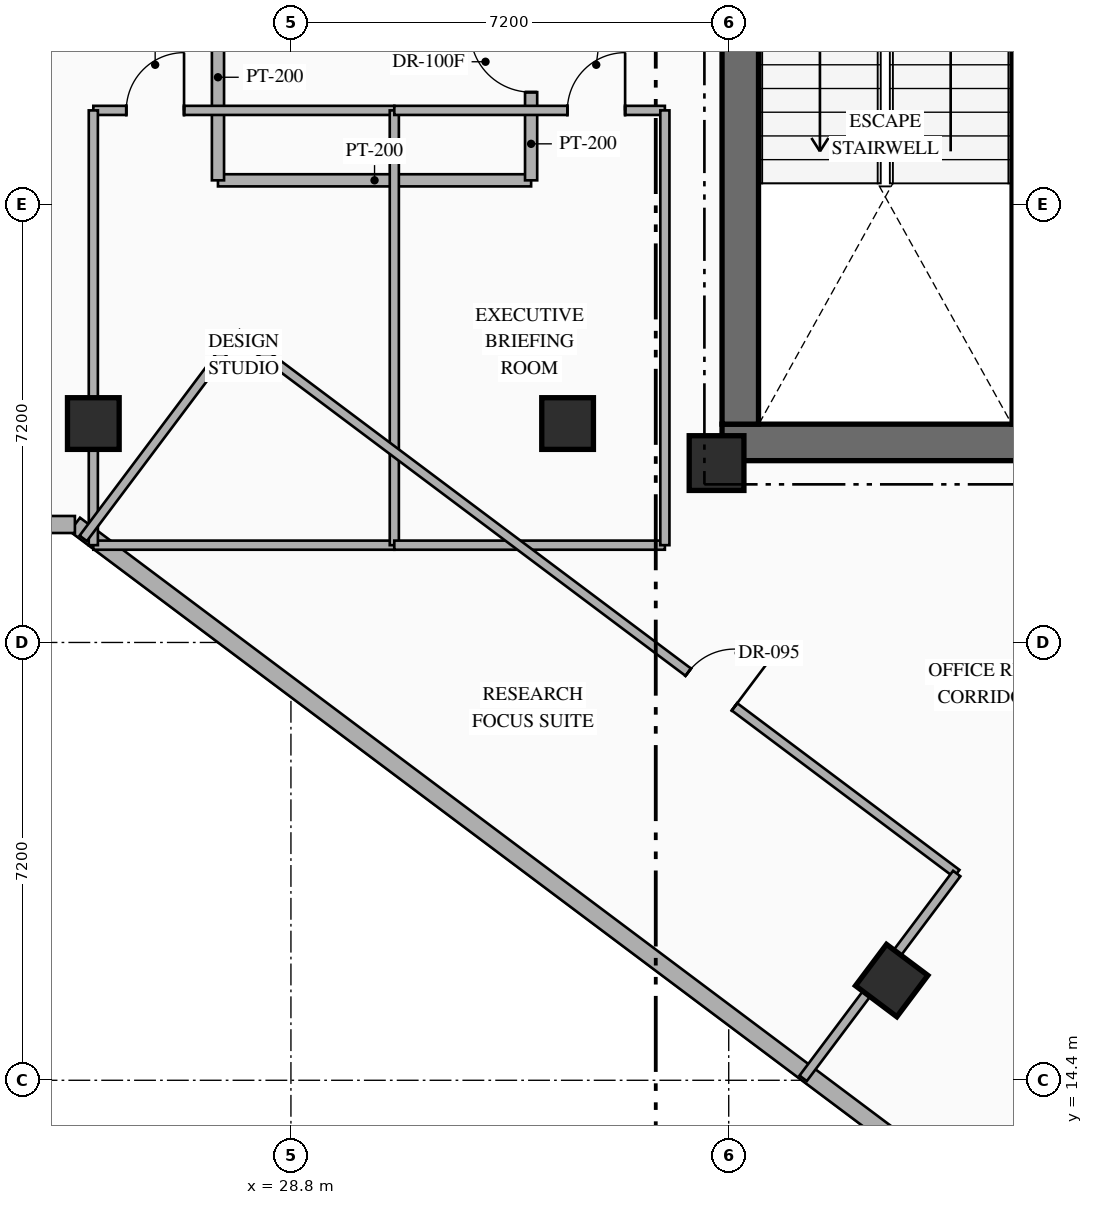
"""IFC4 building model, lengths in metres.
Left out: names, types, materials, properties, quantities, classifications, styles, units other than length and angle.
Written with IfcOpenShell. Run it as: python <this file> out.ifc"""

import sys

from ifc_helpers import new_model, si_unit, direction, frame, frame_2d, origin, origin_2d, place, context, subcontext, project, spatial, rectangle, hollow_rectangle, extrude, element, fill, save


model = new_model("IFC4")
c1 = context("Model", 3, precision=1e-05, world=origin(), true_north=direction((0.0, 1.0)))
c2 = subcontext(c1, "Body", "Model", "MODEL_VIEW")
j1 = project(units=[si_unit("LENGTHUNIT", "METRE"), si_unit("PLANEANGLEUNIT", "RADIAN")], contexts=[c1])
p1 = place(None, origin())
s1 = spatial("IfcSite", under=j1, at=p1, CompositionType="ELEMENT")
p2 = place(p1, origin())
s2 = spatial("IfcBuilding", under=s1, at=p2, CompositionType="ELEMENT")
p3 = place(p2, frame((0.0, 0.0, 160.05)))
s3 = spatial("IfcBuildingStorey", under=s2, at=p3, CompositionType="ELEMENT", Elevation=160.05)
p4 = place(p3, frame((35.89, 24.89, 0.0), z_axis=(0.0, 0.0, 1.0), x_axis=(1.0, 0.0, 0.0)))
e1 = element("IfcWall", 1, at=p4, inside=s3, PredefinedType="SHEAR", context=c2, shape_type="SweptSolid", body=[
    extrude(rectangle(XDim=7.76, YDim=0.6, at=frame_2d((3.88, 0.0))), origin(), (0.0, 0.0, 1.0), 3.6),
])
p5 = place(p3, frame((36.19, 25.19, 0.0), z_axis=(0.0, 0.0, 1.0), x_axis=(0.0, 1.0, 0.0)))
e2 = element("IfcWall", 2, at=p5, inside=s3, PredefinedType="SHEAR", context=c2, shape_type="SweptSolid", body=[
    extrude(rectangle(XDim=9.48, YDim=0.6, at=frame_2d((4.74, 0.0))), origin(), (0.0, 0.0, 1.0), 3.6),
])
p6 = place(p3, frame((40.81, 25.19, 0.0), z_axis=(0.0, 0.0, 1.0), x_axis=(0.0, 1.0, 0.0)))
e3 = element("IfcWall", 3, at=p6, inside=s3, PredefinedType="SHEAR", context=c2, shape_type="SweptSolid", body=[
    extrude(rectangle(XDim=9.48, YDim=0.3, at=frame_2d((4.74, 0.0))), origin(), (0.0, 0.0, 1.0), 3.6),
])
p7 = place(p3, frame((35.8, 24.55, 0.0), z_axis=(0.0, 0.0, 1.0), x_axis=(1.0, 0.0, 0.0)))
e4 = element("IfcColumn", 4, at=p7, inside=s3, PredefinedType="COLUMN", context=c2, shape_type="SweptSolid", body=[
    extrude(rectangle(XDim=0.9, YDim=0.9, at=origin_2d()), origin(), (0.0, 0.0, 1.0), 3.6),
])
for number, where, z_axis, x_axis in (
    (5, (25.55, 25.2, 0.0), (0.0, 0.0, 1.0), (1.0, 0.0, 0.0)),
    (6, (33.35, 25.2, 0.0), (0.0, 0.0, 1.0), (1.0, 0.0, 0.0)),
    (7, (38.68, 16.04, 0.0), (0.0, 0.0, 1.0), (0.8, -0.6, 0.0)),
):
    element("IfcColumn", number, at=place(p3, frame(where, z_axis=z_axis, x_axis=x_axis)), inside=s3, PredefinedType="COLUMN", context=c2, shape_type="SweptSolid", body=[
        extrude(hollow_rectangle(XDim=0.85, YDim=0.85, WallThickness=0.032, at=origin_2d()), origin(), (0.0, 0.0, 1.0), 3.6),
    ])
p8 = place(p3, frame((44.918, 8.787, 0.0), z_axis=(0.0, 0.0, 1.0), x_axis=(-0.800004765927, 0.599993645378, 0.0)))
e8 = element("IfcWall", 8, at=p8, inside=s3, PredefinedType="STANDARD", context=c2, shape_type="SweptSolid", body=[
    extrude(rectangle(XDim=24.588, YDim=0.28, at=frame_2d((12.294, 0.0))), origin(), (0.0, 0.0, 1.0), 3.35),
])
p9 = place(p3, frame((25.247, 23.54, 0.0), z_axis=(0.0, 0.0, 1.0), x_axis=(-1.0, 0.0, 0.0)))
e9 = element("IfcWall", 9, at=p9, inside=s3, PredefinedType="STANDARD", context=c2, shape_type="SweptSolid", body=[
    extrude(rectangle(XDim=6.747, YDim=0.28, at=frame_2d((3.374, 0.0))), origin(), (0.0, 0.0, 1.0), 3.35),
])
p10 = place(p3, frame((27.6, 29.2, 0.0), z_axis=(0.0, 0.0, 1.0), x_axis=(1.0, 0.0, 0.0)))
e10 = element("IfcWall", 10, at=p10, inside=s3, PredefinedType="STANDARD", context=c2, shape_type="SweptSolid", body=[
    extrude(rectangle(XDim=5.15, YDim=0.2, at=frame_2d((2.575, 0.0))), origin(), (0.0, 0.0, 1.0), 3.35),
])
p11 = place(p3, frame((27.6, 29.2, 0.0), z_axis=(0.0, 0.0, 1.0), x_axis=(0.0, 1.0, 0.0)))
e11 = element("IfcWall", 11, at=p11, inside=s3, PredefinedType="STANDARD", context=c2, shape_type="SweptSolid", body=[
    extrude(rectangle(XDim=3.39, YDim=0.2, at=frame_2d((1.695, 0.0))), origin(), (0.0, 0.0, 1.0), 3.35),
])
p12 = place(p3, frame((32.75, 29.2, 0.0), z_axis=(0.0, 0.0, 1.0), x_axis=(0.0, 1.0, 0.0)))
e12 = element("IfcWall", 12, at=p12, inside=s3, PredefinedType="STANDARD", context=c2, shape_type="SweptSolid", body=[
    extrude(rectangle(XDim=3.39, YDim=0.2, at=frame_2d((1.695, 0.0))), origin(), (0.0, 0.0, 1.0), 3.35),
])
p13 = place(p12, frame((1.45, 0.0, 0.0)))
e13 = element("IfcOpeningElement", 13, at=p13, cuts=e12, PredefinedType="OPENING", context=c2, shape_type="SweptSolid", body=[
    extrude(rectangle(XDim=1.0, YDim=2.2, at=frame_2d((0.5, 1.1))), frame((0.0, 0.11, 0.0), z_axis=(0.0, -1.0, 0.0), x_axis=(1.0, 0.0, 0.0)), (0.0, 0.0, 1.0), 0.22),
])
p14 = place(p3, frame((25.55, 23.2, 0.0), z_axis=(0.0, 0.0, 1.0), x_axis=(1.0, 0.0, 0.0)))
e14 = element("IfcWall", 14, at=p14, inside=s3, PredefinedType="PARTITIONING", context=c2, shape_type="SweptSolid", body=[
    extrude(rectangle(XDim=4.95, YDim=0.15, at=frame_2d((2.475, 0.0))), origin(), (0.0, 0.0, 1.0), 3.35),
])
p15 = place(p3, frame((25.55, 30.35, 0.0), z_axis=(0.0, 0.0, 1.0), x_axis=(1.0, 0.0, 0.0)))
e15 = element("IfcWall", 15, at=p15, inside=s3, PredefinedType="PARTITIONING", context=c2, shape_type="SweptSolid", body=[
    extrude(rectangle(XDim=4.95, YDim=0.15, at=frame_2d((2.475, 0.0))), origin(), (0.0, 0.0, 1.0), 3.35),
])
p16 = place(p15, frame((0.542, 0.0, 0.0)))
e16 = element("IfcOpeningElement", 16, at=p16, cuts=e15, PredefinedType="OPENING", context=c2, shape_type="SweptSolid", body=[
    extrude(rectangle(XDim=0.95, YDim=2.15, at=frame_2d((0.475, 1.075))), frame((0.0, 0.085, 0.0), z_axis=(0.0, -1.0, 0.0), x_axis=(1.0, 0.0, 0.0)), (0.0, 0.0, 1.0), 0.17),
])
p17 = place(p3, frame((25.55, 23.2, 0.0), z_axis=(0.0, 0.0, 1.0), x_axis=(0.0, 1.0, 0.0)))
e17 = element("IfcWall", 17, at=p17, inside=s3, PredefinedType="PARTITIONING", context=c2, shape_type="SweptSolid", body=[
    extrude(rectangle(XDim=7.15, YDim=0.15, at=frame_2d((3.575, 0.0))), origin(), (0.0, 0.0, 1.0), 2.695),
])
p18 = place(p3, frame((30.5, 23.2, 0.0), z_axis=(0.0, 0.0, 1.0), x_axis=(0.0, 1.0, 0.0)))
e18 = element("IfcWall", 18, at=p18, inside=s3, PredefinedType="PARTITIONING", context=c2, shape_type="SweptSolid", body=[
    extrude(rectangle(XDim=7.15, YDim=0.15, at=frame_2d((3.575, 0.0))), origin(), (0.0, 0.0, 1.0), 3.35),
])
p19 = place(p3, frame((30.5, 23.2, 0.0), z_axis=(0.0, 0.0, 1.0), x_axis=(1.0, 0.0, 0.0)))
e19 = element("IfcWall", 19, at=p19, inside=s3, PredefinedType="PARTITIONING", context=c2, shape_type="SweptSolid", body=[
    extrude(rectangle(XDim=4.45, YDim=0.15, at=frame_2d((2.225, 0.0))), origin(), (0.0, 0.0, 1.0), 3.35),
])
p20 = place(p3, frame((30.5, 30.35, 0.0), z_axis=(0.0, 0.0, 1.0), x_axis=(1.0, 0.0, 0.0)))
e20 = element("IfcWall", 20, at=p20, inside=s3, PredefinedType="PARTITIONING", context=c2, shape_type="SweptSolid", body=[
    extrude(rectangle(XDim=4.45, YDim=0.15, at=frame_2d((2.225, 0.0))), origin(), (0.0, 0.0, 1.0), 3.35),
])
p21 = place(p20, frame((2.846, 0.0, 0.0)))
e21 = element("IfcOpeningElement", 21, at=p21, cuts=e20, PredefinedType="OPENING", context=c2, shape_type="SweptSolid", body=[
    extrude(rectangle(XDim=0.95, YDim=2.15, at=frame_2d((0.475, 1.075))), frame((0.0, 0.085, 0.0), z_axis=(0.0, -1.0, 0.0), x_axis=(1.0, 0.0, 0.0)), (0.0, 0.0, 1.0), 0.17),
])
p22 = place(p3, frame((34.95, 23.2, 0.0), z_axis=(0.0, 0.0, 1.0), x_axis=(0.0, 1.0, 0.0)))
e22 = element("IfcWall", 22, at=p22, inside=s3, PredefinedType="PARTITIONING", context=c2, shape_type="SweptSolid", body=[
    extrude(rectangle(XDim=7.15, YDim=0.15, at=frame_2d((3.575, 0.0))), origin(), (0.0, 0.0, 1.0), 3.35),
])
p23 = place(p3, frame((27.91, 26.68, 0.0), z_axis=(0.0, 0.0, 1.0), x_axis=(0.800005938517, -0.599992081896, 0.0)))
e23 = element("IfcWall", 23, at=p23, inside=s3, PredefinedType="PARTITIONING", context=c2, shape_type="SweptSolid", body=[
    extrude(rectangle(XDim=14.8, YDim=0.15, at=frame_2d((7.4, 0.0))), origin(), (0.0, 0.0, 1.0), 3.35),
])
p24 = place(p23, frame((9.281, 0.0, 0.0)))
e24 = element("IfcOpeningElement", 24, at=p24, cuts=e23, PredefinedType="OPENING", context=c2, shape_type="SweptSolid", body=[
    extrude(rectangle(XDim=0.95, YDim=2.15, at=frame_2d((0.475, 1.075))), frame((0.0, 0.085, 0.0), z_axis=(0.0, -1.0, 0.0), x_axis=(1.0, 0.0, 0.0)), (0.0, 0.0, 1.0), 0.17),
])
p25 = place(p3, frame((25.384, 23.312, 0.0), z_axis=(0.0, 0.0, 1.0), x_axis=(0.599990721155, 0.80000695905, 0.0)))
e25 = element("IfcWall", 25, at=p25, inside=s3, PredefinedType="PARTITIONING", context=c2, shape_type="SweptSolid", body=[
    extrude(rectangle(XDim=4.21, YDim=0.15, at=frame_2d((2.105, 0.0))), origin(), (0.0, 0.0, 1.0), 3.35),
])
p26 = place(p3, frame((37.224, 14.432, 0.0), z_axis=(0.0, 0.0, 1.0), x_axis=(0.599962885857, 0.800027834262, 0.0)))
e26 = element("IfcWall", 26, at=p26, inside=s3, PredefinedType="PARTITIONING", context=c2, shape_type="SweptSolid", body=[
    extrude(rectangle(XDim=4.21, YDim=0.15, at=frame_2d((2.105, 0.0))), origin(), (0.0, 0.0, 1.0), 2.695),
])
p27 = place(p13, origin())
e27 = element("IfcDoor", 27, at=p27, inside=s3, OperationType="SINGLE_SWING_RIGHT", PredefinedType="DOOR", context=c2, shape_type="SweptSolid", body=[
    extrude(rectangle(XDim=1.0, YDim=2.2, at=frame_2d((0.5, 1.1))), frame((0.0, 0.025, 0.0), z_axis=(0.0, -1.0, 0.0), x_axis=(1.0, 0.0, 0.0)), (0.0, 0.0, 1.0), 0.05),
])
fill(e13, e27)
p28 = place(p16, origin())
e28 = element("IfcDoor", 28, at=p28, inside=s3, OperationType="SINGLE_SWING_RIGHT", PredefinedType="DOOR", context=c2, shape_type="SweptSolid", body=[
    extrude(rectangle(XDim=0.95, YDim=2.15, at=frame_2d((0.475, 1.075))), frame((0.0, 0.025, 0.0), z_axis=(0.0, -1.0, 0.0), x_axis=(1.0, 0.0, 0.0)), (0.0, 0.0, 1.0), 0.05),
])
fill(e16, e28)
p29 = place(p21, origin())
e29 = element("IfcDoor", 29, at=p29, inside=s3, OperationType="SINGLE_SWING_RIGHT", PredefinedType="DOOR", context=c2, shape_type="SweptSolid", body=[
    extrude(rectangle(XDim=0.95, YDim=2.15, at=frame_2d((0.475, 1.075))), frame((0.0, 0.025, 0.0), z_axis=(0.0, -1.0, 0.0), x_axis=(1.0, 0.0, 0.0)), (0.0, 0.0, 1.0), 0.05),
])
fill(e21, e29)
p30 = place(p24, origin())
e30 = element("IfcDoor", 30, at=p30, inside=s3, OperationType="SINGLE_SWING_RIGHT", PredefinedType="DOOR", context=c2, shape_type="SweptSolid", body=[
    extrude(rectangle(XDim=0.95, YDim=2.15, at=frame_2d((0.475, 1.075))), frame((0.0, 0.025, 0.0), z_axis=(0.0, -1.0, 0.0), x_axis=(1.0, 0.0, 0.0)), (0.0, 0.0, 1.0), 0.05),
])
fill(e24, e30)
save(model, sys.argv[1])
